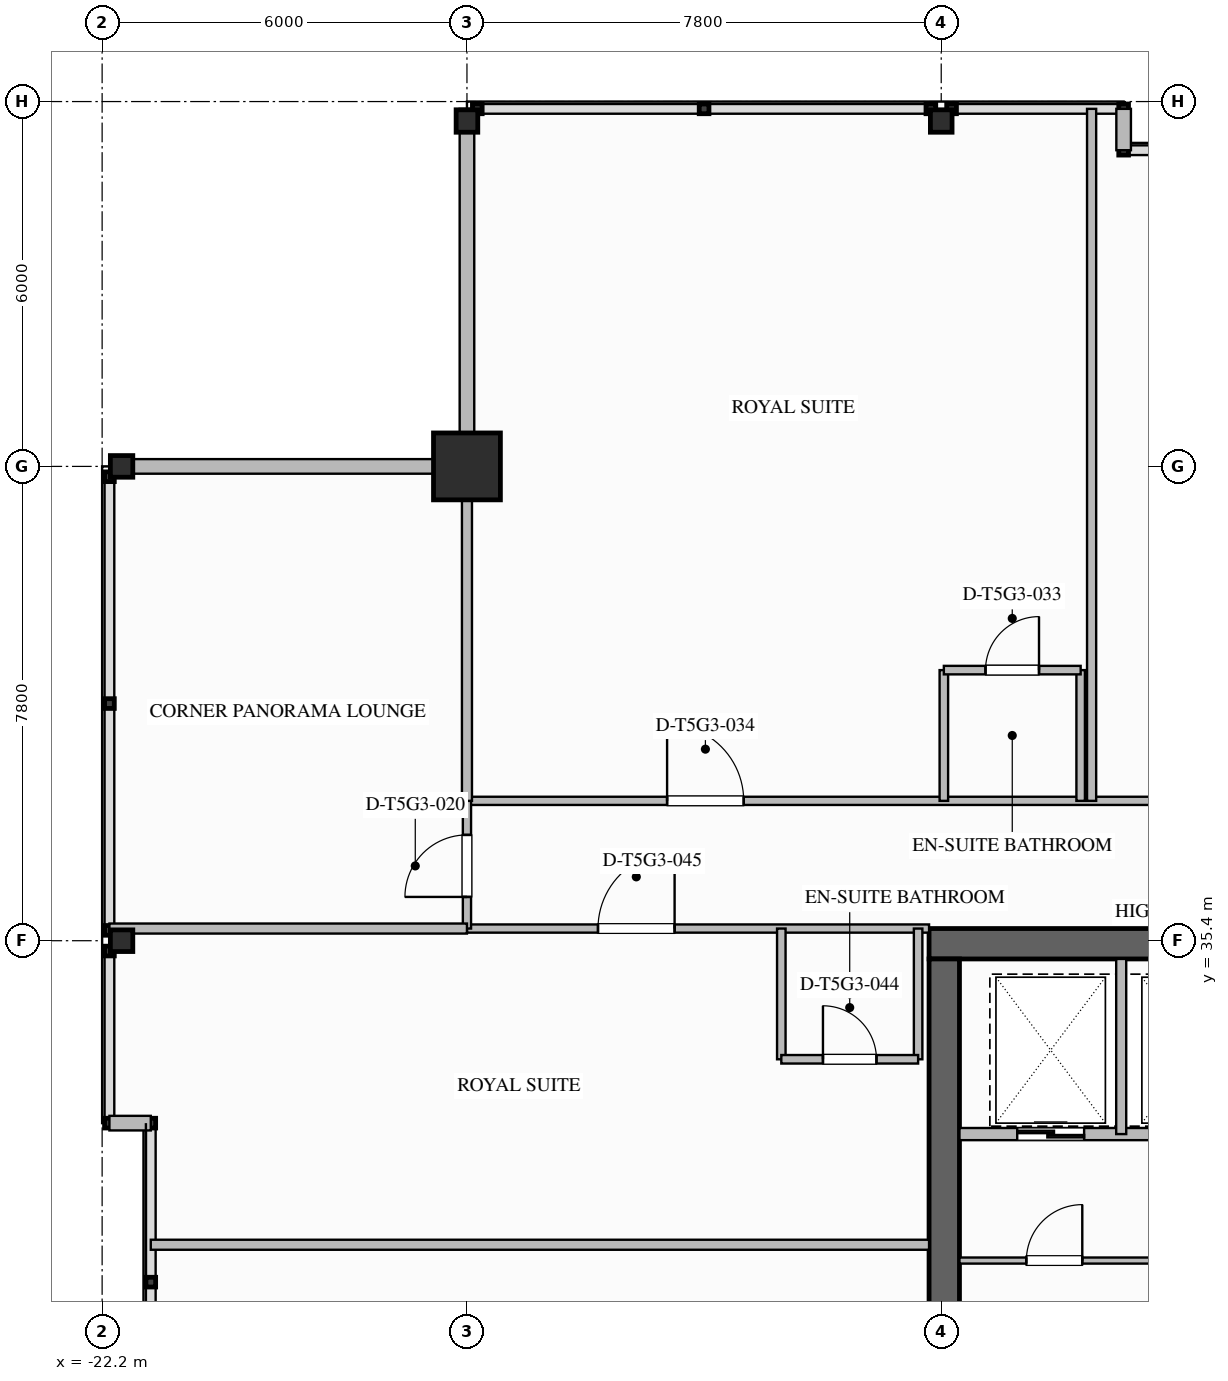
"""IFC4 building model, lengths in metres.
Left out: names, types, materials, properties, quantities, classifications, styles, units other than length and angle.
Written with IfcOpenShell. Run it as: python <this file> out.ifc"""

import sys

from ifc_helpers import new_model, si_unit, direction, frame, frame_2d, origin, origin_2d, place, context, subcontext, project, spatial, rectangle, i_section, extrude, element, fill, save


model = new_model("IFC4")
c1 = context("Model", 3, precision=1e-05, world=origin(), true_north=direction((0.0, 1.0)))
c2 = subcontext(c1, "Body", "Model", "MODEL_VIEW")
j1 = project(units=[si_unit("LENGTHUNIT", "METRE"), si_unit("PLANEANGLEUNIT", "RADIAN")], contexts=[c1])
p1 = place(None, origin())
s1 = spatial("IfcSite", under=j1, at=p1, CompositionType="ELEMENT")
p2 = place(p1, origin())
s2 = spatial("IfcBuilding", under=s1, at=p2, CompositionType="ELEMENT")
p3 = place(p2, frame((0.0, 0.0, 286.9)))
s3 = spatial("IfcBuildingStorey", under=s2, at=p3, CompositionType="ELEMENT", Elevation=286.9)
p4 = place(p3, frame((-8.6, 35.35, 0.0), z_axis=(0.0, 0.0, 1.0), x_axis=(1.0, 0.0, 0.0)))
e1 = element("IfcWall", 1, at=p4, inside=s3, PredefinedType="SHEAR", context=c2, shape_type="SweptSolid", body=[
    extrude(rectangle(XDim=17.2, YDim=0.5, at=frame_2d((8.6, 0.0))), origin(), (0.0, 0.0, 1.0), 3.65),
])
p5 = place(p3, frame((-8.35, 18.9, 0.0), z_axis=(0.0, 0.0, 1.0), x_axis=(0.0, 1.0, 0.0)))
e2 = element("IfcWall", 2, at=p5, inside=s3, PredefinedType="SHEAR", context=c2, shape_type="SweptSolid", body=[
    extrude(rectangle(XDim=16.2, YDim=0.5, at=frame_2d((8.1, 0.0))), origin(), (0.0, 0.0, 1.0), 3.65),
])
p6 = place(p3, frame((-16.2, 43.2, 0.0), z_axis=(0.0, 0.0, 1.0), x_axis=(1.0, 0.0, 0.0)))
e3 = element("IfcColumn", 3, at=p6, inside=s3, PredefinedType="COLUMN", context=c2, shape_type="SweptSolid", body=[
    extrude(rectangle(XDim=1.1, YDim=1.1, at=origin_2d()), origin(), (0.0, 0.0, 1.0), 3.65),
])
for number, where, z_axis, x_axis in (
    (4, (-21.88, 35.4, 0.0), (0.0, 0.0, 1.0), (1.0, 0.0, 0.0)),
    (5, (-21.88, 43.2, 0.0), (0.0, 0.0, 1.0), (1.0, 0.0, 0.0)),
    (6, (-16.2, 48.88, 0.0), (0.0, 0.0, 1.0), (0.0, 1.0, 0.0)),
    (7, (-8.4, 48.88, 0.0), (0.0, 0.0, 1.0), (0.0, 1.0, 0.0)),
):
    element("IfcColumn", number, at=place(p3, frame(where, z_axis=z_axis, x_axis=x_axis)), inside=s3, PredefinedType="COLUMN", context=c2, shape_type="SweptSolid", body=[
        extrude(i_section(OverallWidth=0.369, OverallDepth=0.356, WebThickness=0.011, FlangeThickness=0.018, FilletRadius=0.025, at=origin_2d()), origin(), (0.0, 0.0, 1.0), 3.647),
    ])
for number, where, z_axis, x_axis in (
    (8, (-22.08, 43.2, 0.0), (0.0, 0.0, 1.0), (1.0, 0.0, 0.0)),
    (9, (-16.2, 43.2, 0.0), (0.0, 0.0, 1.0), (0.0, 1.0, 0.0)),
):
    element("IfcWall", number, at=place(p3, frame(where, z_axis=z_axis, x_axis=x_axis)), inside=s3, PredefinedType="STANDARD", context=c2, shape_type="SweptSolid", body=[
        extrude(rectangle(XDim=5.88, YDim=0.24, at=frame_2d((2.94, 0.0))), origin(), (0.0, 0.0, 1.0), 2.779),
    ])
for number, where, z_axis, x_axis in (
    (10, (-21.4, 32.4, 0.0), (0.0, 0.0, 1.0), (-1.0, 0.0, 0.0)),
    (11, (-5.4, 49.08, 0.0), (0.0, 0.0, 1.0), (0.0, -1.0, 0.0)),
):
    element("IfcWall", number, at=place(p3, frame(where, z_axis=z_axis, x_axis=x_axis)), inside=s3, PredefinedType="STANDARD", context=c2, shape_type="SweptSolid", body=[
        extrude(rectangle(XDim=0.68, YDim=0.24, at=frame_2d((0.34, 0.0))), origin(), (0.0, 0.0, 1.0), 3.39),
    ])
p7 = place(p3, frame((-8.1, 32.22, 0.0), z_axis=(0.0, 0.0, 1.0), x_axis=(1.0, 0.0, 0.0)))
e12 = element("IfcWall", 12, at=p7, inside=s3, PredefinedType="SOLIDWALL", context=c2, shape_type="SweptSolid", body=[
    extrude(rectangle(XDim=7.1, YDim=0.2, at=frame_2d((3.55, 0.0))), origin(), (0.0, 0.0, 1.0), 3.39),
])
p8 = place(p7, frame((0.95, 0.0, 0.0)))
e13 = element("IfcOpeningElement", 13, at=p8, cuts=e12, PredefinedType="OPENING", context=c2, shape_type="SweptSolid", body=[
    extrude(rectangle(XDim=1.1, YDim=2.2, at=frame_2d((0.55, 1.1))), frame((0.0, 0.11, 0.0), z_axis=(0.0, -1.0, 0.0), x_axis=(1.0, 0.0, 0.0)), (0.0, 0.0, 1.0), 0.22),
])
p9 = place(p7, frame((3.27, 0.0, 0.0)))
e14 = element("IfcOpeningElement", 14, at=p9, cuts=e12, PredefinedType="OPENING", context=c2, shape_type="SweptSolid", body=[
    extrude(rectangle(XDim=1.1, YDim=2.2, at=frame_2d((0.55, 1.1))), frame((0.0, 0.11, 0.0), z_axis=(0.0, -1.0, 0.0), x_axis=(1.0, 0.0, 0.0)), (0.0, 0.0, 1.0), 0.22),
])
p10 = place(p7, frame((5.59, 0.0, 0.0)))
e15 = element("IfcOpeningElement", 15, at=p10, cuts=e12, PredefinedType="OPENING", context=c2, shape_type="SweptSolid", body=[
    extrude(rectangle(XDim=1.1, YDim=2.2, at=frame_2d((0.55, 1.1))), frame((0.0, 0.11, 0.0), z_axis=(0.0, -1.0, 0.0), x_axis=(1.0, 0.0, 0.0)), (0.0, 0.0, 1.0), 0.22),
])
p11 = place(p3, frame((-5.44, 32.22, 0.0), z_axis=(0.0, 0.0, 1.0), x_axis=(0.0, 1.0, 0.0)))
e16 = element("IfcWall", 16, at=p11, inside=s3, PredefinedType="PARTITIONING", context=c2, shape_type="SweptSolid", body=[
    extrude(rectangle(XDim=2.88, YDim=0.165, at=frame_2d((1.44, 0.0))), origin(), (0.0, 0.0, 1.0), 3.39),
])
p12 = place(p3, frame((-8.1, 30.14, 0.0), z_axis=(0.0, 0.0, 1.0), x_axis=(1.0, 0.0, 0.0)))
e17 = element("IfcWall", 17, at=p12, inside=s3, PredefinedType="PARTITIONING", context=c2, shape_type="SweptSolid", body=[
    extrude(rectangle(XDim=7.1, YDim=0.1, at=frame_2d((3.55, 0.0))), origin(), (0.0, 0.0, 1.0), 3.39),
])
p13 = place(p12, frame((1.1, 0.0, 0.0)))
e18 = element("IfcOpeningElement", 18, at=p13, cuts=e17, PredefinedType="OPENING", context=c2, shape_type="SweptSolid", body=[
    extrude(rectangle(XDim=0.92, YDim=2.1, at=frame_2d((0.46, 1.05))), frame((0.0, 0.06, 0.0), z_axis=(0.0, -1.0, 0.0), x_axis=(1.0, 0.0, 0.0)), (0.0, 0.0, 1.0), 0.12),
])
p14 = place(p12, frame((4.6, 0.0, 0.0)))
e19 = element("IfcOpeningElement", 19, at=p14, cuts=e17, PredefinedType="OPENING", context=c2, shape_type="SweptSolid", body=[
    extrude(rectangle(XDim=0.92, YDim=2.1, at=frame_2d((0.46, 1.05))), frame((0.0, 0.06, 0.0), z_axis=(0.0, -1.0, 0.0), x_axis=(1.0, 0.0, 0.0)), (0.0, 0.0, 1.0), 0.12),
])
p15 = place(p3, frame((-16.2, 37.7, 0.0), z_axis=(0.0, 0.0, 1.0), x_axis=(1.0, 0.0, 0.0)))
e20 = element("IfcWall", 20, at=p15, inside=s3, PredefinedType="PARTITIONING", context=c2, shape_type="SweptSolid", body=[
    extrude(rectangle(XDim=38.28, YDim=0.135, at=frame_2d((19.14, 0.0))), origin(), (0.0, 0.0, 1.0), 3.39),
])
p16 = place(p15, frame((33.355, 0.0, 0.0)))
e21 = element("IfcOpeningElement", 21, at=p16, cuts=e20, PredefinedType="OPENING", context=c2, shape_type="SweptSolid", body=[
    extrude(rectangle(XDim=1.26, YDim=2.2, at=frame_2d((0.63, 1.1))), frame((0.0, 0.077, 0.0), z_axis=(0.0, -1.0, 0.0), x_axis=(1.0, 0.0, 0.0)), (0.0, 0.0, 1.0), 0.155),
])
p17 = place(p15, frame((3.292, 0.0, 0.0)))
e22 = element("IfcOpeningElement", 22, at=p17, cuts=e20, PredefinedType="OPENING", context=c2, shape_type="SweptSolid", body=[
    extrude(rectangle(XDim=1.26, YDim=2.2, at=frame_2d((0.63, 1.1))), frame((0.0, 0.077, 0.0), z_axis=(0.0, -1.0, 0.0), x_axis=(1.0, 0.0, 0.0)), (0.0, 0.0, 1.0), 0.155),
])
p18 = place(p15, frame((16.085, 0.0, 0.0)))
e23 = element("IfcOpeningElement", 23, at=p18, cuts=e20, PredefinedType="OPENING", context=c2, shape_type="SweptSolid", body=[
    extrude(rectangle(XDim=1.02, YDim=2.15, at=frame_2d((0.51, 1.075))), frame((0.0, 0.077, 0.0), z_axis=(0.0, -1.0, 0.0), x_axis=(1.0, 0.0, 0.0)), (0.0, 0.0, 1.0), 0.155),
])
p19 = place(p15, frame((25.813, 0.0, 0.0)))
e24 = element("IfcOpeningElement", 24, at=p19, cuts=e20, PredefinedType="OPENING", context=c2, shape_type="SweptSolid", body=[
    extrude(rectangle(XDim=1.26, YDim=2.2, at=frame_2d((0.63, 1.1))), frame((0.0, 0.077, 0.0), z_axis=(0.0, -1.0, 0.0), x_axis=(1.0, 0.0, 0.0)), (0.0, 0.0, 1.0), 0.155),
])
p20 = place(p3, frame((-16.2, 35.6, 0.0), z_axis=(0.0, 0.0, 1.0), x_axis=(1.0, 0.0, 0.0)))
e25 = element("IfcWall", 25, at=p20, inside=s3, PredefinedType="PARTITIONING", context=c2, shape_type="SweptSolid", body=[
    extrude(rectangle(XDim=7.6, YDim=0.135, at=frame_2d((3.8, 0.0))), origin(), (0.0, 0.0, 1.0), 2.768),
])
p21 = place(p20, frame((2.155, 0.0, 0.0)))
e26 = element("IfcOpeningElement", 26, at=p21, cuts=e25, PredefinedType="OPENING", context=c2, shape_type="SweptSolid", body=[
    extrude(rectangle(XDim=1.26, YDim=2.2, at=frame_2d((0.63, 1.1))), frame((0.0, 0.077, 0.0), z_axis=(0.0, -1.0, 0.0), x_axis=(1.0, 0.0, 0.0)), (0.0, 0.0, 1.0), 0.155),
])
p22 = place(p3, frame((-16.2, 35.6, 0.0), z_axis=(0.0, 0.0, 1.0), x_axis=(0.0, 1.0, 0.0)))
e27 = element("IfcWall", 27, at=p22, inside=s3, PredefinedType="PARTITIONING", context=c2, shape_type="SweptSolid", body=[
    extrude(rectangle(XDim=2.1, YDim=0.135, at=frame_2d((1.05, 0.0))), origin(), (0.0, 0.0, 1.0), 2.764),
])
p23 = place(p22, frame((0.52, 0.0, 0.0)))
e28 = element("IfcOpeningElement", 28, at=p23, cuts=e27, PredefinedType="OPENING", context=c2, shape_type="SweptSolid", body=[
    extrude(rectangle(XDim=1.02, YDim=2.15, at=frame_2d((0.51, 1.075))), frame((0.0, 0.077, 0.0), z_axis=(0.0, -1.0, 0.0), x_axis=(1.0, 0.0, 0.0)), (0.0, 0.0, 1.0), 0.155),
])
p24 = place(p3, frame((-16.2, 37.7, 0.0), z_axis=(0.0, 0.0, 1.0), x_axis=(0.0, 1.0, 0.0)))
e29 = element("IfcWall", 29, at=p24, inside=s3, PredefinedType="PARTITIONING", context=c2, shape_type="SweptSolid", body=[
    extrude(rectangle(XDim=5.38, YDim=0.165, at=frame_2d((2.69, 0.0))), origin(), (0.0, 0.0, 1.0), 2.764),
])
p25 = place(p3, frame((-22.08, 35.6, 0.0), z_axis=(0.0, 0.0, 1.0), x_axis=(1.0, 0.0, 0.0)))
e30 = element("IfcWall", 30, at=p25, inside=s3, PredefinedType="PARTITIONING", context=c2, shape_type="SweptSolid", body=[
    extrude(rectangle(XDim=5.88, YDim=0.165, at=frame_2d((2.94, 0.0))), origin(), (0.0, 0.0, 1.0), 2.764),
])
p26 = place(p3, frame((-8.357, 37.7, 0.0), z_axis=(0.0, 0.0, 1.0), x_axis=(0.0, 1.0, 0.0)))
e31 = element("IfcWall", 31, at=p26, inside=s3, PredefinedType="PLUMBINGWALL", context=c2, shape_type="SweptSolid", body=[
    extrude(rectangle(XDim=2.15, YDim=0.14, at=frame_2d((1.075, 0.0))), origin(), (0.0, 0.0, 1.0), 2.768),
])
p27 = place(p3, frame((-6.107, 37.7, 0.0), z_axis=(0.0, 0.0, 1.0), x_axis=(0.0, 1.0, 0.0)))
e32 = element("IfcWall", 32, at=p27, inside=s3, PredefinedType="PLUMBINGWALL", context=c2, shape_type="SweptSolid", body=[
    extrude(rectangle(XDim=2.15, YDim=0.14, at=frame_2d((1.075, 0.0))), origin(), (0.0, 0.0, 1.0), 3.39),
])
p28 = place(p3, frame((-8.357, 39.85, 0.0), z_axis=(0.0, 0.0, 1.0), x_axis=(1.0, 0.0, 0.0)))
e33 = element("IfcWall", 33, at=p28, inside=s3, PredefinedType="PLUMBINGWALL", context=c2, shape_type="SweptSolid", body=[
    extrude(rectangle(XDim=2.25, YDim=0.14, at=frame_2d((1.125, 0.0))), origin(), (0.0, 0.0, 1.0), 3.39),
])
p29 = place(p28, frame((0.685, 0.0, 0.0)))
e34 = element("IfcOpeningElement", 34, at=p29, cuts=e33, PredefinedType="OPENING", context=c2, shape_type="SweptSolid", body=[
    extrude(rectangle(XDim=0.88, YDim=2.1, at=frame_2d((0.44, 1.05))), frame((0.0, 0.08, 0.0), z_axis=(0.0, -1.0, 0.0), x_axis=(1.0, 0.0, 0.0)), (0.0, 0.0, 1.0), 0.16),
])
p30 = place(p3, frame((-5.927, 37.7, 0.0), z_axis=(0.0, 0.0, 1.0), x_axis=(0.0, 1.0, 0.0)))
e35 = element("IfcWall", 35, at=p30, inside=s3, PredefinedType="PARTITIONING", context=c2, shape_type="SweptSolid", body=[
    extrude(rectangle(XDim=11.38, YDim=0.15, at=frame_2d((5.69, 0.0))), origin(), (0.0, 0.0, 1.0), 3.39),
])
p31 = place(p3, frame((-21.4, 30.4, 0.0), z_axis=(0.0, 0.0, 1.0), x_axis=(1.0, 0.0, 0.0)))
e36 = element("IfcWall", 36, at=p31, inside=s3, PredefinedType="PARTITIONING", context=c2, shape_type="SweptSolid", body=[
    extrude(rectangle(XDim=12.8, YDim=0.165, at=frame_2d((6.4, 0.0))), origin(), (0.0, 0.0, 1.0), 3.39),
])
for number, where, z_axis, x_axis in (
    (37, (-11.03, 35.6, 0.0), (0.0, 0.0, 1.0), (0.0, -1.0, 0.0)),
    (38, (-8.78, 35.6, 0.0), (0.0, 0.0, 1.0), (0.0, -1.0, 0.0)),
):
    element("IfcWall", number, at=place(p3, frame(where, z_axis=z_axis, x_axis=x_axis)), inside=s3, PredefinedType="PLUMBINGWALL", context=c2, shape_type="SweptSolid", body=[
        extrude(rectangle(XDim=2.15, YDim=0.14, at=frame_2d((1.075, 0.0))), origin(), (0.0, 0.0, 1.0), 3.39),
    ])
p32 = place(p3, frame((-11.03, 33.45, 0.0), z_axis=(0.0, 0.0, 1.0), x_axis=(1.0, 0.0, 0.0)))
e39 = element("IfcWall", 39, at=p32, inside=s3, PredefinedType="PLUMBINGWALL", context=c2, shape_type="SweptSolid", body=[
    extrude(rectangle(XDim=2.25, YDim=0.14, at=frame_2d((1.125, 0.0))), origin(), (0.0, 0.0, 1.0), 3.39),
])
p33 = place(p32, frame((0.685, 0.0, 0.0)))
e40 = element("IfcOpeningElement", 40, at=p33, cuts=e39, PredefinedType="OPENING", context=c2, shape_type="SweptSolid", body=[
    extrude(rectangle(XDim=0.88, YDim=2.1, at=frame_2d((0.44, 1.05))), frame((0.0, 0.08, 0.0), z_axis=(0.0, -1.0, 0.0), x_axis=(1.0, 0.0, 0.0)), (0.0, 0.0, 1.0), 0.16),
])
p34 = place(p8, origin())
e41 = element("IfcDoor", 41, at=p34, inside=s3, OperationType="SLIDING_TO_LEFT", PredefinedType="DOOR", context=c2, shape_type="SweptSolid", body=[
    extrude(rectangle(XDim=1.1, YDim=2.2, at=frame_2d((0.55, 1.1))), frame((0.0, 0.025, 0.0), z_axis=(0.0, -1.0, 0.0), x_axis=(1.0, 0.0, 0.0)), (0.0, 0.0, 1.0), 0.05),
])
fill(e13, e41)
p35 = place(p13, origin())
e42 = element("IfcDoor", 42, at=p35, inside=s3, OperationType="SINGLE_SWING_RIGHT", PredefinedType="DOOR", context=c2, shape_type="SweptSolid", body=[
    extrude(rectangle(XDim=0.92, YDim=2.1, at=frame_2d((0.46, 1.05))), frame((0.0, 0.025, 0.0), z_axis=(0.0, -1.0, 0.0), x_axis=(1.0, 0.0, 0.0)), (0.0, 0.0, 1.0), 0.05),
])
fill(e18, e42)
p36 = place(p23, origin())
e43 = element("IfcDoor", 43, at=p36, inside=s3, OperationType="SINGLE_SWING_LEFT", PredefinedType="DOOR", context=c2, shape_type="SweptSolid", body=[
    extrude(rectangle(XDim=1.02, YDim=2.15, at=frame_2d((0.51, 1.075))), frame((0.0, 0.025, 0.0), z_axis=(0.0, -1.0, 0.0), x_axis=(1.0, 0.0, 0.0)), (0.0, 0.0, 1.0), 0.05),
])
fill(e28, e43)
p37 = place(p29, origin())
e44 = element("IfcDoor", 44, at=p37, inside=s3, OperationType="SINGLE_SWING_RIGHT", PredefinedType="DOOR", context=c2, shape_type="SweptSolid", body=[
    extrude(rectangle(XDim=0.88, YDim=2.1, at=frame_2d((0.44, 1.05))), frame((0.0, 0.025, 0.0), z_axis=(0.0, -1.0, 0.0), x_axis=(1.0, 0.0, 0.0)), (0.0, 0.0, 1.0), 0.05),
])
fill(e34, e44)
p38 = place(p17, origin())
e45 = element("IfcDoor", 45, at=p38, inside=s3, OperationType="SINGLE_SWING_LEFT", PredefinedType="DOOR", context=c2, shape_type="SweptSolid", body=[
    extrude(rectangle(XDim=1.26, YDim=2.2, at=frame_2d((0.63, 1.1))), frame((0.0, 0.025, 0.0), z_axis=(0.0, -1.0, 0.0), x_axis=(1.0, 0.0, 0.0)), (0.0, 0.0, 1.0), 0.05),
])
fill(e22, e45)
p39 = place(p33, origin())
e46 = element("IfcDoor", 46, at=p39, inside=s3, OperationType="SINGLE_SWING_LEFT", PredefinedType="DOOR", context=c2, shape_type="SweptSolid", body=[
    extrude(rectangle(XDim=0.88, YDim=2.1, at=frame_2d((0.44, 1.05))), frame((0.0, 0.025, 0.0), z_axis=(0.0, -1.0, 0.0), x_axis=(1.0, 0.0, 0.0)), (0.0, 0.0, 1.0), 0.05),
])
fill(e40, e46)
p40 = place(p21, origin())
e47 = element("IfcDoor", 47, at=p40, inside=s3, OperationType="SINGLE_SWING_RIGHT", PredefinedType="DOOR", context=c2, shape_type="SweptSolid", body=[
    extrude(rectangle(XDim=1.26, YDim=2.2, at=frame_2d((0.63, 1.1))), frame((0.0, 0.025, 0.0), z_axis=(0.0, -1.0, 0.0), x_axis=(1.0, 0.0, 0.0)), (0.0, 0.0, 1.0), 0.05),
])
fill(e26, e47)
save(model, sys.argv[1])
